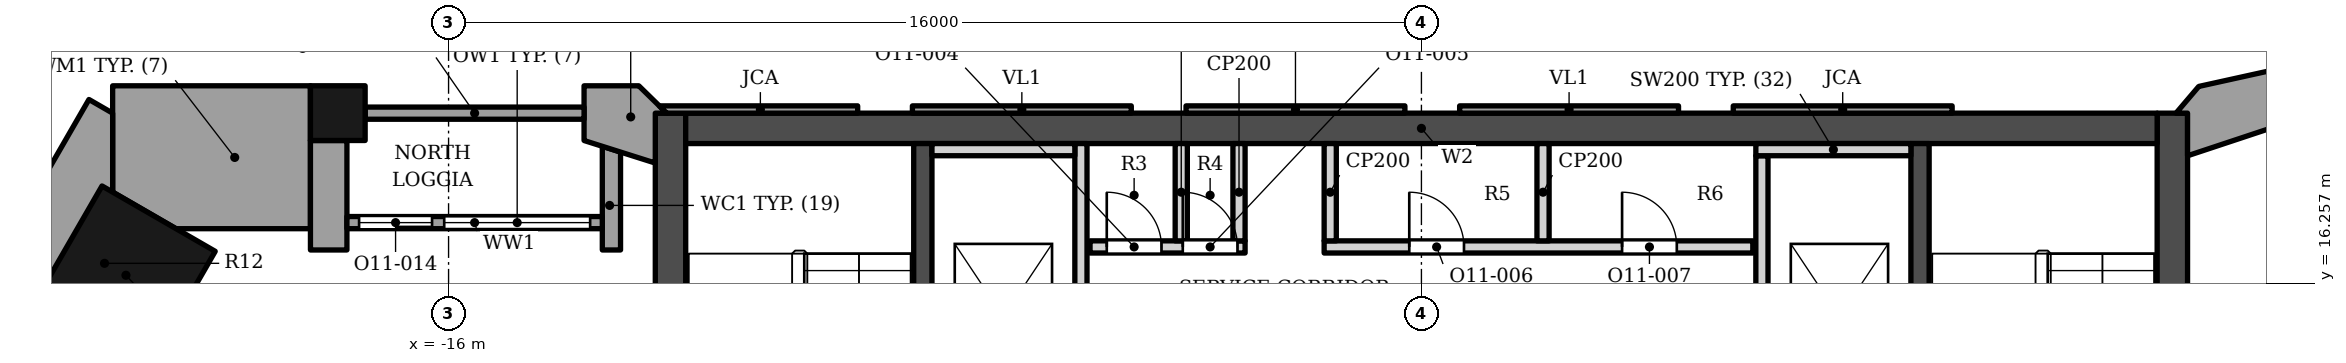
"""IFC4 building model, lengths in metres.
Left out: names, types, materials, properties, quantities, classifications, styles, units other than length and angle.
Written with IfcOpenShell. Run it as: python <this file> out.ifc"""

import sys

from ifc_helpers import new_model, si_unit, direction, frame, frame_2d, origin, origin_2d, place, context, subcontext, project, spatial, polyline, rectangle, outline, extrude, element, fill, save


model = new_model("IFC4")
c1 = context("Model", 3, precision=1e-05, world=origin(), true_north=direction((0.0, 1.0)))
c2 = subcontext(c1, "Body", "Model", "MODEL_VIEW")
j1 = project(units=[si_unit("LENGTHUNIT", "METRE"), si_unit("PLANEANGLEUNIT", "RADIAN")], contexts=[c1])
p1 = place(None, origin())
s1 = spatial("IfcSite", under=j1, at=p1, CompositionType="ELEMENT")
p2 = place(p1, origin())
s2 = spatial("IfcBuilding", under=s1, at=p2, CompositionType="ELEMENT")
p3 = place(p2, frame((0.0, 0.0, 271.6)))
s3 = spatial("IfcBuildingStorey", under=s2, at=p3, CompositionType="ELEMENT", Elevation=271.6)
p4 = place(p3, frame((-12.1, 18.802, 0.0), z_axis=(0.0, 0.0, 1.0), x_axis=(1.0, 0.0, 0.0)))
e1 = element("IfcWall", 1, at=p4, inside=s3, PredefinedType="SHEAR", context=c2, shape_type="SweptSolid", body=[
    extrude(rectangle(XDim=24.2, YDim=0.5, at=frame_2d((12.1, 0.0))), origin(), (0.0, 0.0, 1.0), 3.9),
])
p5 = place(p3, frame((-12.35, 5.253, 0.0), z_axis=(0.0, 0.0, 1.0), x_axis=(0.0, 1.0, 0.0)))
e2 = element("IfcWall", 2, at=p5, inside=s3, PredefinedType="SHEAR", context=c2, shape_type="SweptSolid", body=[
    extrude(rectangle(XDim=13.8, YDim=0.5, at=frame_2d((6.9, 0.0))), origin(), (0.0, 0.0, 1.0), 3.9),
])
p6 = place(p3, frame((-8.2, 5.253, 0.0), z_axis=(0.0, 0.0, 1.0), x_axis=(0.0, 1.0, 0.0)))
e3 = element("IfcWall", 3, at=p6, inside=s3, PredefinedType="SHEAR", context=c2, shape_type="SweptSolid", body=[
    extrude(rectangle(XDim=13.3, YDim=0.3, at=frame_2d((6.65, 0.0))), origin(), (0.0, 0.0, 1.0), 3.9),
])
p7 = place(p6, frame((7.1, 0.0, 0.0)))
e4 = element("IfcOpeningElement", 4, at=p7, cuts=e3, PredefinedType="OPENING", context=c2, shape_type="SweptSolid", body=[
    extrude(rectangle(XDim=1.4, YDim=2.1, at=frame_2d((0.7, 1.05))), frame((0.0, 0.16, 0.0), z_axis=(0.0, -1.0, 0.0), x_axis=(1.0, 0.0, 0.0)), (0.0, 0.0, 1.0), 0.32),
])
p8 = place(p6, frame((5.05, 0.0, 0.0)))
e5 = element("IfcOpeningElement", 5, at=p8, cuts=e3, PredefinedType="OPENING", context=c2, shape_type="SweptSolid", body=[
    extrude(rectangle(XDim=1.4, YDim=2.1, at=frame_2d((0.7, 1.05))), frame((0.0, 0.16, 0.0), z_axis=(0.0, -1.0, 0.0), x_axis=(1.0, 0.0, 0.0)), (0.0, 0.0, 1.0), 0.32),
])
p9 = place(p3, frame((12.35, 5.253, 0.0), z_axis=(0.0, 0.0, 1.0), x_axis=(0.0, 1.0, 0.0)))
e6 = element("IfcWall", 6, at=p9, inside=s3, PredefinedType="SHEAR", context=c2, shape_type="SweptSolid", body=[
    extrude(rectangle(XDim=13.8, YDim=0.5, at=frame_2d((6.9, 0.0))), origin(), (0.0, 0.0, 1.0), 3.9),
])
p10 = place(p3, frame((8.2, 5.253, 0.0), z_axis=(0.0, 0.0, 1.0), x_axis=(0.0, 1.0, 0.0)))
e7 = element("IfcWall", 7, at=p10, inside=s3, PredefinedType="SHEAR", context=c2, shape_type="SweptSolid", body=[
    extrude(rectangle(XDim=13.3, YDim=0.3, at=frame_2d((6.65, 0.0))), origin(), (0.0, 0.0, 1.0), 3.9),
])
p11 = place(p10, frame((7.1, 0.0, 0.0)))
e8 = element("IfcOpeningElement", 8, at=p11, cuts=e7, PredefinedType="OPENING", context=c2, shape_type="SweptSolid", body=[
    extrude(rectangle(XDim=1.4, YDim=2.1, at=frame_2d((0.7, 1.05))), frame((0.0, 0.16, 0.0), z_axis=(0.0, -1.0, 0.0), x_axis=(1.0, 0.0, 0.0)), (0.0, 0.0, 1.0), 0.32),
])
p12 = place(p10, frame((5.05, 0.0, 0.0)))
e9 = element("IfcOpeningElement", 9, at=p12, cuts=e7, PredefinedType="OPENING", context=c2, shape_type="SweptSolid", body=[
    extrude(rectangle(XDim=1.4, YDim=2.1, at=frame_2d((0.7, 1.05))), frame((0.0, 0.16, 0.0), z_axis=(0.0, -1.0, 0.0), x_axis=(1.0, 0.0, 0.0)), (0.0, 0.0, 1.0), 0.32),
])
p13 = place(p3, frame((-21.306, 16.387, 0.0), z_axis=(0.0, 0.0, 1.0), x_axis=(0.866025412511, -0.499999984885, 0.0)))
e10 = element("IfcColumn", 10, at=p13, inside=s3, PredefinedType="COLUMN", context=c2, shape_type="SweptSolid", body=[
    extrude(rectangle(XDim=2.15, YDim=2.15, at=origin_2d()), origin(), (0.0, 0.0, 1.0), 3.9),
])
p14 = place(p3, frame((-17.822, 19.053, 0.0), z_axis=(0.0, 0.0, 1.0), x_axis=(-1.0, 0.0, 0.0)))
e11 = element("IfcColumn", 11, at=p14, inside=s3, PredefinedType="COLUMN", context=c2, shape_type="SweptSolid", body=[
    extrude(rectangle(XDim=0.9, YDim=0.9, at=origin_2d()), origin(), (0.0, 0.0, 1.0), 3.9),
])
p15 = place(p3, origin())
e12 = element("IfcWall", 12, at=p15, inside=s3, PredefinedType="SOLIDWALL", context=c2, shape_type="SweptSolid", body=[
    extrude(outline(polyline([(-12.412, 19.052), (-12.872, 19.502), (-13.771, 19.502), (-13.771, 18.603), (-12.6, 18.232), (-12.6, 19.052), (-12.412, 19.052)])), origin(), (0.0, 0.0, 1.0), 3.0),
])
p16 = place(p3, origin())
e13 = element("IfcWall", 13, at=p16, inside=s3, PredefinedType="SOLIDWALL", context=c2, shape_type="SweptSolid", body=[
    extrude(outline(polyline([(-13.472, 16.802), (-13.172, 16.802), (-13.172, 18.413), (-13.472, 18.508), (-13.472, 17.153), (-13.472, 16.802)])), origin(), (0.0, 0.0, 1.0), 3.0),
])
p17 = place(p3, origin())
e14 = element("IfcWall", 14, at=p17, inside=s3, PredefinedType="SOLIDWALL", context=c2, shape_type="SweptSolid", body=[
    extrude(outline(polyline([(-18.271, 18.603), (-18.271, 16.802), (-17.672, 16.802), (-17.672, 18.603), (-18.271, 18.603)])), origin(), (0.0, 0.0, 1.0), 3.0),
])
p18 = place(p3, origin())
e15 = element("IfcWall", 15, at=p18, inside=s3, PredefinedType="SOLIDWALL", context=c2, shape_type="SweptSolid", body=[
    extrude(outline(polyline([(5.128, 19.173), (5.128, 19.052), (8.729, 19.052), (8.729, 19.173), (5.128, 19.173)])), origin(), (0.0, 0.0, 1.0), 3.0),
])
p19 = place(p3, origin())
e16 = element("IfcWall", 16, at=p19, inside=s3, PredefinedType="ELEMENTEDWALL", context=c2, shape_type="SweptSolid", body=[
    extrude(outline(polyline([(0.628, 19.173), (0.628, 19.052), (4.229, 19.052), (4.229, 19.173), (0.628, 19.173)])), origin(), (0.0, 0.0, 1.0), 3.0),
])
p20 = place(p3, origin())
e17 = element("IfcWall", 17, at=p20, inside=s3, PredefinedType="SOLIDWALL", context=c2, shape_type="SweptSolid", body=[
    extrude(outline(polyline([(-3.872, 19.173), (-3.872, 19.052), (-0.271, 19.052), (-0.271, 19.173), (-3.872, 19.173)])), origin(), (0.0, 0.0, 1.0), 3.0),
])
p21 = place(p3, origin())
e18 = element("IfcWall", 18, at=p21, inside=s3, PredefinedType="ELEMENTEDWALL", context=c2, shape_type="SweptSolid", body=[
    extrude(outline(polyline([(-8.372, 19.173), (-8.372, 19.052), (-4.771, 19.052), (-4.771, 19.173), (-8.372, 19.173)])), origin(), (0.0, 0.0, 1.0), 3.0),
])
p22 = place(p3, origin())
e19 = element("IfcWall", 19, at=p22, inside=s3, PredefinedType="SOLIDWALL", context=c2, shape_type="SweptSolid", body=[
    extrude(outline(polyline([(-12.411, 19.052), (-9.271, 19.052), (-9.271, 19.173), (-12.533, 19.173), (-12.411, 19.052)])), origin(), (0.0, 0.0, 1.0), 3.0),
])
p23 = place(p3, frame((-13.771, 19.052, 0.0), z_axis=(0.0, 0.0, 1.0), x_axis=(-1.0, 0.0, 0.0)))
e20 = element("IfcWall", 20, at=p23, inside=s3, PredefinedType="SOLIDWALL", context=c2, shape_type="SweptSolid", body=[
    extrude(rectangle(XDim=3.6, YDim=0.2, at=frame_2d((1.8, 0.0))), origin(), (0.0, 0.0, 1.0), 3.0),
])
p24 = place(p3, frame((-13.472, 17.252, 0.0), z_axis=(0.0, 0.0, 1.0), x_axis=(-1.0, 0.0, 0.0)))
e21 = element("IfcWall", 21, at=p24, inside=s3, PredefinedType="ELEMENTEDWALL", context=c2, shape_type="SweptSolid", body=[
    extrude(rectangle(XDim=4.2, YDim=0.2, at=frame_2d((2.1, 0.0))), origin(), (0.0, 0.0, 1.0), 3.0),
])
p25 = place(p24, frame((0.2, 0.0, 0.45)))
e22 = element("IfcOpeningElement", 22, at=p25, cuts=e21, PredefinedType="OPENING", context=c2, shape_type="SweptSolid", body=[
    extrude(rectangle(XDim=2.4, YDim=2.25, at=frame_2d((1.2, 1.125))), frame((0.0, 0.11, 0.0), z_axis=(0.0, -1.0, 0.0), x_axis=(1.0, 0.0, 0.0)), (0.0, 0.0, 1.0), 0.22),
])
p26 = place(p24, frame((2.8, 0.0, 0.0)))
e23 = element("IfcOpeningElement", 23, at=p26, cuts=e21, PredefinedType="OPENING", context=c2, shape_type="SweptSolid", body=[
    extrude(rectangle(XDim=1.2, YDim=2.7, at=frame_2d((0.6, 1.35))), frame((0.0, 0.11, 0.0), z_axis=(0.0, -1.0, 0.0), x_axis=(1.0, 0.0, 0.0)), (0.0, 0.0, 1.0), 0.22),
])
p27 = place(p3, origin())
e24 = element("IfcWall", 24, at=p27, inside=s3, PredefinedType="SOLIDWALL", context=c2, shape_type="SweptSolid", body=[
    extrude(outline(polyline([(-20.482, 17.153), (-18.271, 17.153), (-18.271, 18.603), (-18.272, 18.603), (-18.272, 19.502), (-21.525, 19.502), (-21.525, 17.755), (-20.482, 17.153)])), origin(), (0.0, 0.0, 1.0), 3.0),
])
p28 = place(p3, origin())
e25 = element("IfcWall", 25, at=p28, inside=s3, PredefinedType="SOLIDWALL", context=c2, shape_type="SweptSolid", body=[
    extrude(outline(polyline([(-22.774, 15.993), (-21.525, 17.755), (-21.525, 19.052), (-21.914, 19.278), (-24.113, 15.469), (-22.419, 14.491), (-21.516, 15.267), (-22.774, 15.993)])), origin(), (0.0, 0.0, 1.0), 3.0),
])
p29 = place(p3, origin())
e26 = element("IfcWall", 26, at=p29, inside=s3, PredefinedType="SOLIDWALL", context=c2, shape_type="SweptSolid", body=[
    extrude(outline(polyline([(14.201, 18.883), (14.008, 19.762), (12.784, 19.492), (12.41, 19.052), (12.6, 19.052), (12.6, 18.352), (14.201, 18.883)])), origin(), (0.0, 0.0, 1.0), 3.0),
])
p30 = place(p3, frame((-5.6, 14.253, 0.0), z_axis=(0.0, 0.0, 1.0), x_axis=(0.0, 1.0, 0.0)))
e27 = element("IfcWall", 27, at=p30, inside=s3, PredefinedType="SOLIDWALL", context=c2, shape_type="SweptSolid", body=[
    extrude(rectangle(XDim=4.3, YDim=0.2, at=frame_2d((2.15, 0.0))), origin(), (0.0, 0.0, 1.0), 3.73),
])
p31 = place(p3, frame((5.6, 15.453, 0.0), z_axis=(0.0, 0.0, 1.0), x_axis=(0.0, 1.0, 0.0)))
e28 = element("IfcWall", 28, at=p31, inside=s3, PredefinedType="SOLIDWALL", context=c2, shape_type="SweptSolid", body=[
    extrude(rectangle(XDim=2.9, YDim=0.2, at=frame_2d((1.45, 0.0))), origin(), (0.0, 0.0, 1.0), 3.73),
])
p32 = place(p3, frame((-5.45, 16.853, 0.0), z_axis=(0.0, 0.0, 1.0), x_axis=(1.0, 0.0, 0.0)))
e29 = element("IfcWall", 29, at=p32, inside=s3, PredefinedType="SOLIDWALL", context=c2, shape_type="SweptSolid", body=[
    extrude(rectangle(XDim=2.55, YDim=0.2, at=frame_2d((1.275, 0.0))), origin(), (0.0, 0.0, 1.0), 3.73),
])
p33 = place(p32, frame((0.275, 0.0, 0.0)))
e30 = element("IfcOpeningElement", 30, at=p33, cuts=e29, PredefinedType="OPENING", context=c2, shape_type="SweptSolid", body=[
    extrude(rectangle(XDim=0.9, YDim=2.1, at=frame_2d((0.45, 1.05))), frame((0.0, 0.11, 0.0), z_axis=(0.0, -1.0, 0.0), x_axis=(1.0, 0.0, 0.0)), (0.0, 0.0, 1.0), 0.22),
])
p34 = place(p32, frame((1.525, 0.0, 0.0)))
e31 = element("IfcOpeningElement", 31, at=p34, cuts=e29, PredefinedType="OPENING", context=c2, shape_type="SweptSolid", body=[
    extrude(rectangle(XDim=0.9, YDim=2.1, at=frame_2d((0.45, 1.05))), frame((0.0, 0.11, 0.0), z_axis=(0.0, -1.0, 0.0), x_axis=(1.0, 0.0, 0.0)), (0.0, 0.0, 1.0), 0.22),
])
p35 = place(p3, frame((-1.6, 16.853, 0.0), z_axis=(0.0, 0.0, 1.0), x_axis=(1.0, 0.0, 0.0)))
e32 = element("IfcWall", 32, at=p35, inside=s3, PredefinedType="SOLIDWALL", context=c2, shape_type="SweptSolid", body=[
    extrude(rectangle(XDim=7.05, YDim=0.2, at=frame_2d((3.525, 0.0))), origin(), (0.0, 0.0, 1.0), 3.73),
])
p36 = place(p35, frame((1.4, 0.0, 0.0)))
e33 = element("IfcOpeningElement", 33, at=p36, cuts=e32, PredefinedType="OPENING", context=c2, shape_type="SweptSolid", body=[
    extrude(rectangle(XDim=0.9, YDim=2.1, at=frame_2d((0.45, 1.05))), frame((0.0, 0.11, 0.0), z_axis=(0.0, -1.0, 0.0), x_axis=(1.0, 0.0, 0.0)), (0.0, 0.0, 1.0), 0.22),
])
p37 = place(p35, frame((4.9, 0.0, 0.0)))
e34 = element("IfcOpeningElement", 34, at=p37, cuts=e32, PredefinedType="OPENING", context=c2, shape_type="SweptSolid", body=[
    extrude(rectangle(XDim=0.9, YDim=2.1, at=frame_2d((0.45, 1.05))), frame((0.0, 0.11, 0.0), z_axis=(0.0, -1.0, 0.0), x_axis=(1.0, 0.0, 0.0)), (0.0, 0.0, 1.0), 0.22),
])
for number, where, z_axis, x_axis in (
    (35, (-3.95, 16.953, 0.0), (0.0, 0.0, 1.0), (0.0, 1.0, 0.0)),
    (36, (-3.0, 16.953, 0.0), (0.0, 0.0, 1.0), (0.0, 1.0, 0.0)),
    (37, (-1.5, 16.953, 0.0), (0.0, 0.0, 1.0), (0.0, 1.0, 0.0)),
    (38, (2.0, 16.953, 0.0), (0.0, 0.0, 1.0), (0.0, 1.0, 0.0)),
):
    element("IfcWall", number, at=place(p3, frame(where, z_axis=z_axis, x_axis=x_axis)), inside=s3, PredefinedType="PARTITIONING", context=c2, shape_type="SweptSolid", body=[
        extrude(rectangle(XDim=1.6, YDim=0.2, at=frame_2d((0.8, 0.0))), origin(), (0.0, 0.0, 1.0), 3.73),
    ])
p38 = place(p3, frame((-8.05, 18.453, 0.0), z_axis=(0.0, 0.0, 1.0), x_axis=(1.0, 0.0, 0.0)))
e39 = element("IfcWall", 39, at=p38, inside=s3, PredefinedType="SOLIDWALL", context=c2, shape_type="SweptSolid", body=[
    extrude(rectangle(XDim=2.35, YDim=0.2, at=frame_2d((1.175, 0.0))), origin(), (0.0, 0.0, 1.0), 3.73),
])
p39 = place(p3, frame((5.5, 18.453, 0.0), z_axis=(0.0, 0.0, 1.0), x_axis=(1.0, 0.0, 0.0)))
e40 = element("IfcWall", 40, at=p39, inside=s3, PredefinedType="SOLIDWALL", context=c2, shape_type="SweptSolid", body=[
    extrude(rectangle(XDim=2.55, YDim=0.2, at=frame_2d((1.275, 0.0))), origin(), (0.0, 0.0, 1.0), 3.73),
])
p40 = place(p25, origin())
e41 = element("IfcWindow", 41, at=p40, inside=s3, PartitioningType="SINGLE_PANEL", PredefinedType="WINDOW", context=c2, shape_type="SweptSolid", body=[
    extrude(rectangle(XDim=2.4, YDim=2.25, at=frame_2d((1.2, 1.125))), frame((0.0, 0.03, 0.0), z_axis=(0.0, -1.0, 0.0), x_axis=(1.0, 0.0, 0.0)), (0.0, 0.0, 1.0), 0.06),
])
fill(e22, e41)
p41 = place(p26, origin())
e42 = element("IfcDoor", 42, at=p41, inside=s3, OperationType="SINGLE_SWING_LEFT", PredefinedType="DOOR", context=c2, shape_type="SweptSolid", body=[
    extrude(rectangle(XDim=1.2, YDim=2.7, at=frame_2d((0.6, 1.35))), frame((0.0, 0.025, 0.0), z_axis=(0.0, -1.0, 0.0), x_axis=(1.0, 0.0, 0.0)), (0.0, 0.0, 1.0), 0.05),
])
fill(e23, e42)
p42 = place(p33, origin())
e43 = element("IfcDoor", 43, at=p42, inside=s3, OperationType="SINGLE_SWING_LEFT", PredefinedType="DOOR", context=c2, shape_type="SweptSolid", body=[
    extrude(rectangle(XDim=0.9, YDim=2.1, at=frame_2d((0.45, 1.05))), frame((0.0, 0.025, 0.0), z_axis=(0.0, -1.0, 0.0), x_axis=(1.0, 0.0, 0.0)), (0.0, 0.0, 1.0), 0.05),
])
fill(e30, e43)
p43 = place(p34, origin())
e44 = element("IfcDoor", 44, at=p43, inside=s3, OperationType="SINGLE_SWING_LEFT", PredefinedType="DOOR", context=c2, shape_type="SweptSolid", body=[
    extrude(rectangle(XDim=0.9, YDim=2.1, at=frame_2d((0.45, 1.05))), frame((0.0, 0.025, 0.0), z_axis=(0.0, -1.0, 0.0), x_axis=(1.0, 0.0, 0.0)), (0.0, 0.0, 1.0), 0.05),
])
fill(e31, e44)
p44 = place(p36, origin())
e45 = element("IfcDoor", 45, at=p44, inside=s3, OperationType="SINGLE_SWING_LEFT", PredefinedType="DOOR", context=c2, shape_type="SweptSolid", body=[
    extrude(rectangle(XDim=0.9, YDim=2.1, at=frame_2d((0.45, 1.05))), frame((0.0, 0.025, 0.0), z_axis=(0.0, -1.0, 0.0), x_axis=(1.0, 0.0, 0.0)), (0.0, 0.0, 1.0), 0.05),
])
fill(e33, e45)
p45 = place(p37, origin())
e46 = element("IfcDoor", 46, at=p45, inside=s3, OperationType="SINGLE_SWING_LEFT", PredefinedType="DOOR", context=c2, shape_type="SweptSolid", body=[
    extrude(rectangle(XDim=0.9, YDim=2.1, at=frame_2d((0.45, 1.05))), frame((0.0, 0.025, 0.0), z_axis=(0.0, -1.0, 0.0), x_axis=(1.0, 0.0, 0.0)), (0.0, 0.0, 1.0), 0.05),
])
fill(e34, e46)
save(model, sys.argv[1])
